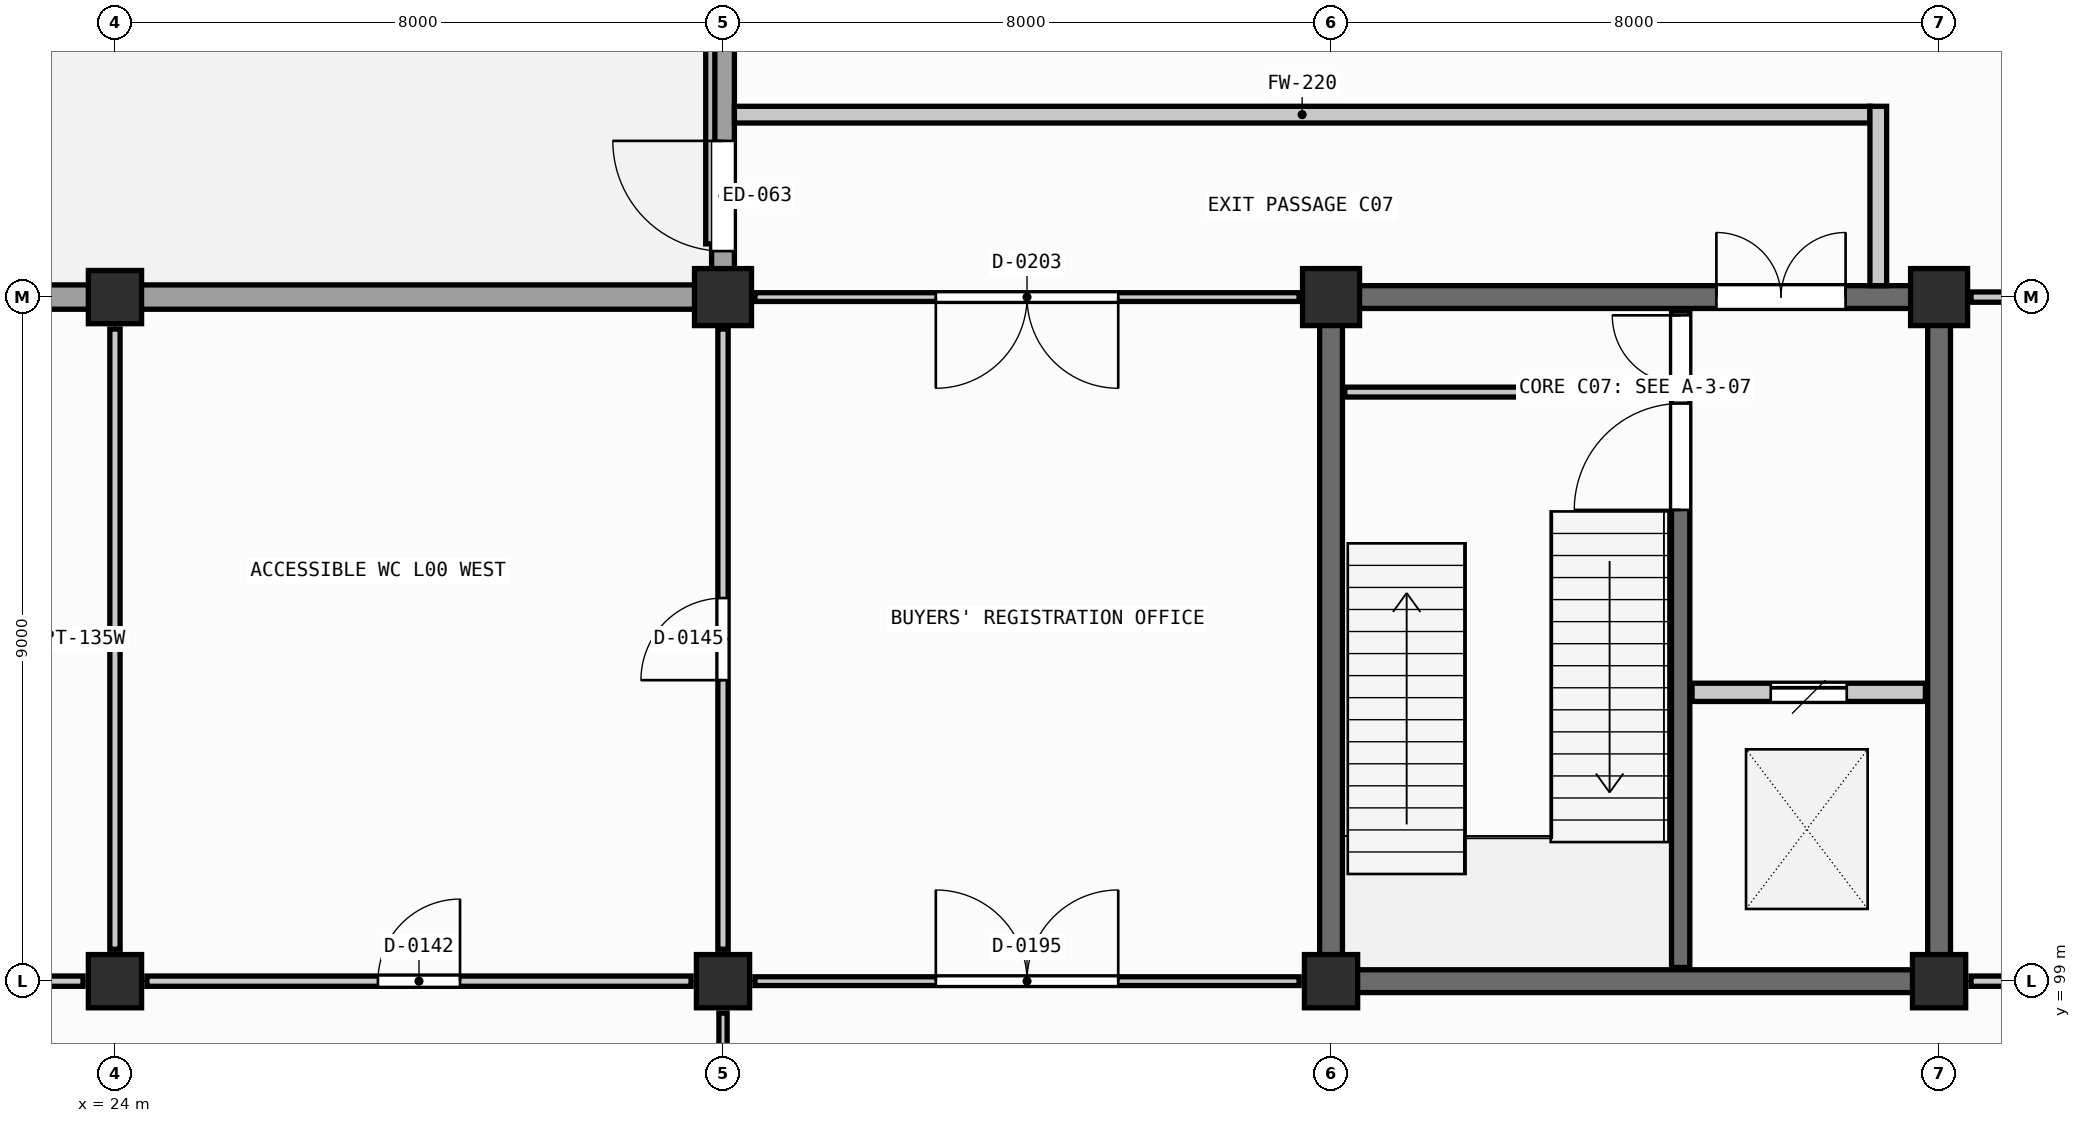
"""IFC4 building model, lengths in metres.
Left out: names, types, materials, properties, quantities, classifications, styles, units other than length and angle.
Written with IfcOpenShell. Run it as: python <this file> out.ifc"""

import sys

from ifc_helpers import new_model, si_unit, direction, frame, frame_2d, origin, origin_2d, place, context, subcontext, project, spatial, rectangle, extrude, element, fill, save


model = new_model("IFC4")
c1 = context("Model", 3, precision=1e-05, world=origin(), true_north=direction((0.0, 1.0)))
c2 = subcontext(c1, "Body", "Model", "MODEL_VIEW")
j1 = project(units=[si_unit("LENGTHUNIT", "METRE"), si_unit("PLANEANGLEUNIT", "RADIAN")], contexts=[c1])
p1 = place(None, origin())
s1 = spatial("IfcSite", under=j1, at=p1, CompositionType="ELEMENT")
p2 = place(p1, origin())
s2 = spatial("IfcBuilding", under=s1, at=p2, CompositionType="ELEMENT")
p3 = place(p2, origin())
s3 = spatial("IfcBuildingStorey", under=s2, at=p3, CompositionType="ELEMENT", Elevation=0.0)
for number, where, z_axis, x_axis in (
    (1, (24.0, 99.0, -1.25), (0.0, 0.0, 1.0), (1.0, 0.0, 0.0)),
    (2, (24.0, 108.0, -1.25), (0.0, 0.0, 1.0), (1.0, 0.0, 0.0)),
    (3, (32.0, 99.0, -1.25), (0.0, 0.0, 1.0), (1.0, 0.0, 0.0)),
):
    element("IfcColumn", number, at=place(p3, frame(where, z_axis=z_axis, x_axis=x_axis)), inside=s3, PredefinedType="COLUMN", context=c2, shape_type="SweptSolid", body=[
        extrude(rectangle(XDim=0.7, YDim=0.7, at=origin_2d()), origin(), (0.0, 0.0, 1.0), 6.05),
    ])
p4 = place(p3, frame((32.0, 108.0, -1.25), z_axis=(0.0, 0.0, 1.0), x_axis=(1.0, 0.0, 0.0)))
e4 = element("IfcColumn", 4, at=p4, inside=s3, PredefinedType="COLUMN", context=c2, shape_type="SweptSolid", body=[
    extrude(rectangle(XDim=0.75, YDim=0.75, at=origin_2d()), origin(), (0.0, 0.0, 1.0), 6.05),
])
p5 = place(p3, frame((40.0, 99.0, -1.25), z_axis=(0.0, 0.0, 1.0), x_axis=(1.0, 0.0, 0.0)))
e5 = element("IfcColumn", 5, at=p5, inside=s3, PredefinedType="COLUMN", context=c2, shape_type="SweptSolid", body=[
    extrude(rectangle(XDim=0.7, YDim=0.7, at=origin_2d()), origin(), (0.0, 0.0, 1.0), 6.05),
])
p6 = place(p3, frame((40.0, 108.0, -1.25), z_axis=(0.0, 0.0, 1.0), x_axis=(1.0, 0.0, 0.0)))
e6 = element("IfcColumn", 6, at=p6, inside=s3, PredefinedType="COLUMN", context=c2, shape_type="SweptSolid", body=[
    extrude(rectangle(XDim=0.75, YDim=0.75, at=origin_2d()), origin(), (0.0, 0.0, 1.0), 6.05),
])
p7 = place(p3, frame((48.0, 99.0, -1.25), z_axis=(0.0, 0.0, 1.0), x_axis=(1.0, 0.0, 0.0)))
e7 = element("IfcColumn", 7, at=p7, inside=s3, PredefinedType="COLUMN", context=c2, shape_type="SweptSolid", body=[
    extrude(rectangle(XDim=0.7, YDim=0.7, at=origin_2d()), origin(), (0.0, 0.0, 1.0), 6.05),
])
p8 = place(p3, frame((48.0, 108.0, -1.25), z_axis=(0.0, 0.0, 1.0), x_axis=(1.0, 0.0, 0.0)))
e8 = element("IfcColumn", 8, at=p8, inside=s3, PredefinedType="COLUMN", context=c2, shape_type="SweptSolid", body=[
    extrude(rectangle(XDim=0.75, YDim=0.75, at=origin_2d()), origin(), (0.0, 0.0, 1.0), 6.05),
])
p9 = place(p3, frame((23.655, 108.0, 0.0), z_axis=(0.0, 0.0, 1.0), x_axis=(-1.0, 0.0, 0.0)))
e9 = element("IfcWall", 9, at=p9, inside=s3, PredefinedType="SOLIDWALL", context=c2, shape_type="SweptSolid", body=[
    extrude(rectangle(XDim=7.31, YDim=0.32, at=frame_2d((3.655, 0.0))), origin(), (0.0, 0.0, 1.0), 3.65),
])
p10 = place(p3, frame((31.63, 108.0, 0.0), z_axis=(0.0, 0.0, 1.0), x_axis=(-1.0, 0.0, 0.0)))
e10 = element("IfcWall", 10, at=p10, inside=s3, PredefinedType="SOLIDWALL", context=c2, shape_type="SweptSolid", body=[
    extrude(rectangle(XDim=7.285, YDim=0.32, at=frame_2d((3.643, 0.0))), origin(), (0.0, 0.0, 1.0), 3.65),
])
p11 = place(p3, frame((32.0, 116.655, 0.0), z_axis=(0.0, 0.0, 1.0), x_axis=(0.0, -1.0, 0.0)))
e11 = element("IfcWall", 11, at=p11, inside=s3, PredefinedType="SOLIDWALL", context=c2, shape_type="SweptSolid", body=[
    extrude(rectangle(XDim=8.285, YDim=0.3, at=frame_2d((4.143, 0.0))), origin(), (0.0, 0.0, 1.0), 3.65),
])
p12 = place(p11, frame((3.417, 0.0, 0.0)))
e12 = element("IfcOpeningElement", 12, at=p12, cuts=e11, PredefinedType="OPENING", context=c2, shape_type="SweptSolid", body=[
    extrude(rectangle(XDim=1.45, YDim=2.2, at=frame_2d((0.725, 1.1))), frame((0.0, 0.16, 0.0), z_axis=(0.0, -1.0, 0.0), x_axis=(1.0, 0.0, 0.0)), (0.0, 0.0, 1.0), 0.32),
])
p13 = place(p11, frame((6.6, 0.0, 0.0)))
e13 = element("IfcOpeningElement", 13, at=p13, cuts=e11, PredefinedType="OPENING", context=c2, shape_type="SweptSolid", body=[
    extrude(rectangle(XDim=1.45, YDim=2.2, at=frame_2d((0.725, 1.1))), frame((0.0, 0.16, 0.0), z_axis=(0.0, -1.0, 0.0), x_axis=(1.0, 0.0, 0.0)), (0.0, 0.0, 1.0), 0.32),
])
p14 = place(p3, frame((40.345, 99.0, -1.25), z_axis=(0.0, 0.0, 1.0), x_axis=(1.0, 0.0, 0.0)))
e14 = element("IfcWall", 14, at=p14, inside=s3, PredefinedType="SHEAR", context=c2, shape_type="SweptSolid", body=[
    extrude(rectangle(XDim=7.31, YDim=0.3, at=frame_2d((3.655, 0.0))), origin(), (0.0, 0.0, 1.0), 5.805),
])
p15 = place(p3, frame((40.37, 108.0, -1.25), z_axis=(0.0, 0.0, 1.0), x_axis=(1.0, 0.0, 0.0)))
e15 = element("IfcWall", 15, at=p15, inside=s3, PredefinedType="SHEAR", context=c2, shape_type="SweptSolid", body=[
    extrude(rectangle(XDim=7.26, YDim=0.3, at=frame_2d((3.63, 0.0))), origin(), (0.0, 0.0, 1.0), 5.805),
])
p16 = place(p15, frame((4.7, 0.0, 1.25)))
e16 = element("IfcOpeningElement", 16, at=p16, cuts=e15, PredefinedType="OPENING", context=c2, shape_type="SweptSolid", body=[
    extrude(rectangle(XDim=1.7, YDim=2.25, at=frame_2d((0.85, 1.125))), frame((0.0, 0.16, 0.0), z_axis=(0.0, -1.0, 0.0), x_axis=(1.0, 0.0, 0.0)), (0.0, 0.0, 1.0), 0.32),
])
for number, where, z_axis, x_axis in (
    (17, (40.0, 99.345, -1.25), (0.0, 0.0, 1.0), (0.0, 1.0, 0.0)),
    (18, (48.0, 99.345, -1.25), (0.0, 0.0, 1.0), (0.0, 1.0, 0.0)),
):
    element("IfcWall", number, at=place(p3, frame(where, z_axis=z_axis, x_axis=x_axis)), inside=s3, PredefinedType="SHEAR", context=c2, shape_type="SweptSolid", body=[
        extrude(rectangle(XDim=8.285, YDim=0.3, at=frame_2d((4.143, 0.0))), origin(), (0.0, 0.0, 1.0), 5.805),
    ])
p17 = place(p3, frame((44.6, 99.18, -1.25), z_axis=(0.0, 0.0, 1.0), x_axis=(0.0, 1.0, 0.0)))
e19 = element("IfcWall", 19, at=p17, inside=s3, PredefinedType="SHEAR", context=c2, shape_type="SweptSolid", body=[
    extrude(rectangle(XDim=8.64, YDim=0.24, at=frame_2d((4.32, 0.0))), origin(), (0.0, 0.0, 1.0), 5.805),
])
p18 = place(p17, frame((6.02, 0.0, 1.25)))
e20 = element("IfcOpeningElement", 20, at=p18, cuts=e19, PredefinedType="OPENING", context=c2, shape_type="SweptSolid", body=[
    extrude(rectangle(XDim=1.4, YDim=2.2, at=frame_2d((0.7, 1.1))), frame((0.0, 0.13, 0.0), z_axis=(0.0, -1.0, 0.0), x_axis=(1.0, 0.0, 0.0)), (0.0, 0.0, 1.0), 0.26),
])
p19 = place(p17, frame((7.68, 0.0, 1.25)))
e21 = element("IfcOpeningElement", 21, at=p19, cuts=e19, PredefinedType="OPENING", context=c2, shape_type="SweptSolid", body=[
    extrude(rectangle(XDim=0.9, YDim=2.05, at=frame_2d((0.45, 1.025))), frame((0.0, 0.13, 0.0), z_axis=(0.0, -1.0, 0.0), x_axis=(1.0, 0.0, 0.0)), (0.0, 0.0, 1.0), 0.26),
])
p20 = place(p3, frame((40.18, 106.75, 0.0), z_axis=(0.0, 0.0, 1.0), x_axis=(1.0, 0.0, 0.0)))
e22 = element("IfcWall", 22, at=p20, inside=s3, PredefinedType="PARTITIONING", context=c2, shape_type="SweptSolid", body=[
    extrude(rectangle(XDim=4.28, YDim=0.13, at=frame_2d((2.14, 0.0))), origin(), (0.0, 0.0, 1.0), 3.905),
])
p21 = place(p3, frame((44.75, 102.8, 0.0), z_axis=(0.0, 0.0, 1.0), x_axis=(1.0, 0.0, 0.0)))
e23 = element("IfcWall", 23, at=p21, inside=s3, PredefinedType="SHEAR", context=c2, shape_type="SweptSolid", body=[
    extrude(rectangle(XDim=3.07, YDim=0.24, at=frame_2d((1.535, 0.0))), origin(), (0.0, 0.0, 1.0), 3.905),
])
p22 = place(p21, frame((1.035, 0.0, 0.0)))
e24 = element("IfcOpeningElement", 24, at=p22, cuts=e23, PredefinedType="OPENING", context=c2, shape_type="SweptSolid", body=[
    extrude(rectangle(XDim=1.0, YDim=2.15, at=frame_2d((0.5, 1.075))), frame((0.0, 0.13, 0.0), z_axis=(0.0, -1.0, 0.0), x_axis=(1.0, 0.0, 0.0)), (0.0, 0.0, 1.0), 0.26),
])
p23 = place(p3, frame((20.06, 99.0, 0.0), z_axis=(0.0, 0.0, 1.0), x_axis=(1.0, 0.0, 0.0)))
e25 = element("IfcWall", 25, at=p23, inside=s3, PredefinedType="PLUMBINGWALL", context=c2, shape_type="SweptSolid", body=[
    extrude(rectangle(XDim=3.52, YDim=0.135, at=frame_2d((1.76, 0.0))), origin(), (0.0, 0.0, 1.0), 3.65),
])
p24 = place(p23, frame((1.3, 0.0, 0.0)))
e26 = element("IfcOpeningElement", 26, at=p24, cuts=e25, PredefinedType="OPENING", context=c2, shape_type="SweptSolid", body=[
    extrude(rectangle(XDim=0.92, YDim=2.08, at=frame_2d((0.46, 1.04))), frame((0.0, 0.078, 0.0), z_axis=(0.0, -1.0, 0.0), x_axis=(1.0, 0.0, 0.0)), (0.0, 0.0, 1.0), 0.155),
])
p25 = place(p3, frame((24.42, 99.0, 0.0), z_axis=(0.0, 0.0, 1.0), x_axis=(1.0, 0.0, 0.0)))
e27 = element("IfcWall", 27, at=p25, inside=s3, PredefinedType="PLUMBINGWALL", context=c2, shape_type="SweptSolid", body=[
    extrude(rectangle(XDim=7.16, YDim=0.135, at=frame_2d((3.58, 0.0))), origin(), (0.0, 0.0, 1.0), 3.65),
])
p26 = place(p25, frame((3.04, 0.0, 0.0)))
e28 = element("IfcOpeningElement", 28, at=p26, cuts=e27, PredefinedType="OPENING", context=c2, shape_type="SweptSolid", body=[
    extrude(rectangle(XDim=1.08, YDim=2.12, at=frame_2d((0.54, 1.06))), frame((0.0, 0.078, 0.0), z_axis=(0.0, -1.0, 0.0), x_axis=(1.0, 0.0, 0.0)), (0.0, 0.0, 1.0), 0.155),
])
p27 = place(p3, frame((32.0, 90.42, 0.0), z_axis=(0.0, 0.0, 1.0), x_axis=(0.0, 1.0, 0.0)))
e29 = element("IfcWall", 29, at=p27, inside=s3, PredefinedType="PARTITIONING", context=c2, shape_type="SweptSolid", body=[
    extrude(rectangle(XDim=8.16, YDim=0.108, at=frame_2d((4.08, 0.0))), origin(), (0.0, 0.0, 1.0), 3.65),
])
p28 = place(p27, frame((2.955, 0.0, 0.0)))
e30 = element("IfcOpeningElement", 30, at=p28, cuts=e29, PredefinedType="OPENING", context=c2, shape_type="SweptSolid", body=[
    extrude(rectangle(XDim=2.25, YDim=2.38, at=frame_2d((1.125, 1.19))), frame((0.0, 0.064, 0.0), z_axis=(0.0, -1.0, 0.0), x_axis=(1.0, 0.0, 0.0)), (0.0, 0.0, 1.0), 0.128),
])
p29 = place(p3, frame((24.0, 99.42, 0.0), z_axis=(0.0, 0.0, 1.0), x_axis=(0.0, 1.0, 0.0)))
e31 = element("IfcWall", 31, at=p29, inside=s3, PredefinedType="PLUMBINGWALL", context=c2, shape_type="SweptSolid", body=[
    extrude(rectangle(XDim=8.16, YDim=0.135, at=frame_2d((4.08, 0.0))), origin(), (0.0, 0.0, 1.0), 3.65),
])
p30 = place(p3, frame((32.0, 99.42, 0.0), z_axis=(0.0, 0.0, 1.0), x_axis=(0.0, 1.0, 0.0)))
e32 = element("IfcWall", 32, at=p30, inside=s3, PredefinedType="PLUMBINGWALL", context=c2, shape_type="SweptSolid", body=[
    extrude(rectangle(XDim=8.16, YDim=0.135, at=frame_2d((4.08, 0.0))), origin(), (0.0, 0.0, 1.0), 3.65),
])
p31 = place(p30, frame((3.54, 0.0, 0.0)))
e33 = element("IfcOpeningElement", 33, at=p31, cuts=e32, PredefinedType="OPENING", context=c2, shape_type="SweptSolid", body=[
    extrude(rectangle(XDim=1.08, YDim=2.12, at=frame_2d((0.54, 1.06))), frame((0.0, 0.078, 0.0), z_axis=(0.0, -1.0, 0.0), x_axis=(1.0, 0.0, 0.0)), (0.0, 0.0, 1.0), 0.155),
])
p32 = place(p3, frame((32.42, 99.0, 0.0), z_axis=(0.0, 0.0, 1.0), x_axis=(1.0, 0.0, 0.0)))
e34 = element("IfcWall", 34, at=p32, inside=s3, PredefinedType="PARTITIONING", context=c2, shape_type="SweptSolid", body=[
    extrude(rectangle(XDim=7.16, YDim=0.115, at=frame_2d((3.58, 0.0))), origin(), (0.0, 0.0, 1.0), 3.65),
])
p33 = place(p32, frame((2.38, 0.0, 0.0)))
e35 = element("IfcOpeningElement", 35, at=p33, cuts=e34, PredefinedType="OPENING", context=c2, shape_type="SweptSolid", body=[
    extrude(rectangle(XDim=2.4, YDim=2.4, at=frame_2d((1.2, 1.2))), frame((0.0, 0.067, 0.0), z_axis=(0.0, -1.0, 0.0), x_axis=(1.0, 0.0, 0.0)), (0.0, 0.0, 1.0), 0.135),
])
p34 = place(p3, frame((48.42, 99.0, 0.0), z_axis=(0.0, 0.0, 1.0), x_axis=(1.0, 0.0, 0.0)))
e36 = element("IfcWall", 36, at=p34, inside=s3, PredefinedType="PLUMBINGWALL", context=c2, shape_type="SweptSolid", body=[
    extrude(rectangle(XDim=7.16, YDim=0.135, at=frame_2d((3.58, 0.0))), origin(), (0.0, 0.0, 1.0), 3.65),
])
p35 = place(p34, frame((3.12, 0.0, 0.0)))
e37 = element("IfcOpeningElement", 37, at=p35, cuts=e36, PredefinedType="OPENING", context=c2, shape_type="SweptSolid", body=[
    extrude(rectangle(XDim=0.92, YDim=2.08, at=frame_2d((0.46, 1.04))), frame((0.0, 0.078, 0.0), z_axis=(0.0, -1.0, 0.0), x_axis=(1.0, 0.0, 0.0)), (0.0, 0.0, 1.0), 0.155),
])
p36 = place(p3, frame((32.42, 108.0, 0.0), z_axis=(0.0, 0.0, 1.0), x_axis=(1.0, 0.0, 0.0)))
e38 = element("IfcWall", 38, at=p36, inside=s3, PredefinedType="PARTITIONING", context=c2, shape_type="SweptSolid", body=[
    extrude(rectangle(XDim=7.16, YDim=0.115, at=frame_2d((3.58, 0.0))), origin(), (0.0, 0.0, 1.0), 3.65),
])
p37 = place(p36, frame((2.38, 0.0, 0.0)))
e39 = element("IfcOpeningElement", 39, at=p37, cuts=e38, PredefinedType="OPENING", context=c2, shape_type="SweptSolid", body=[
    extrude(rectangle(XDim=2.4, YDim=2.4, at=frame_2d((1.2, 1.2))), frame((0.0, 0.067, 0.0), z_axis=(0.0, -1.0, 0.0), x_axis=(1.0, 0.0, 0.0)), (0.0, 0.0, 1.0), 0.135),
])
p38 = place(p3, frame((48.42, 108.0, 0.0), z_axis=(0.0, 0.0, 1.0), x_axis=(1.0, 0.0, 0.0)))
e40 = element("IfcWall", 40, at=p38, inside=s3, PredefinedType="PLUMBINGWALL", context=c2, shape_type="SweptSolid", body=[
    extrude(rectangle(XDim=7.16, YDim=0.135, at=frame_2d((3.58, 0.0))), origin(), (0.0, 0.0, 1.0), 3.65),
])
p39 = place(p38, frame((3.12, 0.0, 0.0)))
e41 = element("IfcOpeningElement", 41, at=p39, cuts=e40, PredefinedType="OPENING", context=c2, shape_type="SweptSolid", body=[
    extrude(rectangle(XDim=0.92, YDim=2.08, at=frame_2d((0.46, 1.04))), frame((0.0, 0.078, 0.0), z_axis=(0.0, -1.0, 0.0), x_axis=(1.0, 0.0, 0.0)), (0.0, 0.0, 1.0), 0.155),
])
p40 = place(p3, frame((32.15, 110.4, 0.0), z_axis=(0.0, 0.0, 1.0), x_axis=(1.0, 0.0, 0.0)))
e42 = element("IfcWall", 42, at=p40, inside=s3, PredefinedType="SOLIDWALL", context=c2, shape_type="SweptSolid", body=[
    extrude(rectangle(XDim=14.94, YDim=0.22, at=frame_2d((7.47, 0.0))), origin(), (0.0, 0.0, 1.0), 3.65),
])
p41 = place(p3, frame((47.2, 108.15, 0.0), z_axis=(0.0, 0.0, 1.0), x_axis=(0.0, 1.0, 0.0)))
e43 = element("IfcWall", 43, at=p41, inside=s3, PredefinedType="SOLIDWALL", context=c2, shape_type="SweptSolid", body=[
    extrude(rectangle(XDim=2.36, YDim=0.22, at=frame_2d((1.18, 0.0))), origin(), (0.0, 0.0, 1.0), 3.65),
])
p42 = place(p18, origin())
e44 = element("IfcDoor", 44, at=p42, inside=s3, OperationType="SINGLE_SWING_LEFT", PredefinedType="DOOR", context=c2, shape_type="SweptSolid", body=[
    extrude(rectangle(XDim=1.4, YDim=2.2, at=frame_2d((0.7, 1.1))), frame((0.0, 0.025, 0.0), z_axis=(0.0, -1.0, 0.0), x_axis=(1.0, 0.0, 0.0)), (0.0, 0.0, 1.0), 0.05),
])
fill(e20, e44)
p43 = place(p19, origin())
e45 = element("IfcDoor", 45, at=p43, inside=s3, OperationType="SINGLE_SWING_RIGHT", PredefinedType="DOOR", context=c2, shape_type="SweptSolid", body=[
    extrude(rectangle(XDim=0.9, YDim=2.05, at=frame_2d((0.45, 1.025))), frame((0.0, 0.025, 0.0), z_axis=(0.0, -1.0, 0.0), x_axis=(1.0, 0.0, 0.0)), (0.0, 0.0, 1.0), 0.05),
])
fill(e21, e45)
p44 = place(p16, origin())
e46 = element("IfcDoor", 46, at=p44, inside=s3, OperationType="DOUBLE_DOOR_SINGLE_SWING", PredefinedType="DOOR", context=c2, shape_type="SweptSolid", body=[
    extrude(rectangle(XDim=1.7, YDim=2.25, at=frame_2d((0.85, 1.125))), frame((0.0, 0.025, 0.0), z_axis=(0.0, -1.0, 0.0), x_axis=(1.0, 0.0, 0.0)), (0.0, 0.0, 1.0), 0.05),
])
fill(e16, e46)
p45 = place(p22, origin())
e47 = element("IfcDoor", 47, at=p45, inside=s3, OperationType="SLIDING_TO_LEFT", PredefinedType="DOOR", context=c2, shape_type="SweptSolid", body=[
    extrude(rectangle(XDim=1.0, YDim=2.15, at=frame_2d((0.5, 1.075))), frame((0.0, 0.025, 0.0), z_axis=(0.0, -1.0, 0.0), x_axis=(1.0, 0.0, 0.0)), (0.0, 0.0, 1.0), 0.05),
])
fill(e24, e47)
p46 = place(p26, origin())
e48 = element("IfcDoor", 48, at=p46, inside=s3, OperationType="SINGLE_SWING_RIGHT", PredefinedType="DOOR", context=c2, shape_type="SweptSolid", body=[
    extrude(rectangle(XDim=1.08, YDim=2.12, at=frame_2d((0.54, 1.06))), frame((0.0, 0.025, 0.0), z_axis=(0.0, -1.0, 0.0), x_axis=(1.0, 0.0, 0.0)), (0.0, 0.0, 1.0), 0.05),
])
fill(e28, e48)
p47 = place(p31, origin())
e49 = element("IfcDoor", 49, at=p47, inside=s3, OperationType="SINGLE_SWING_LEFT", PredefinedType="DOOR", context=c2, shape_type="SweptSolid", body=[
    extrude(rectangle(XDim=1.08, YDim=2.12, at=frame_2d((0.54, 1.06))), frame((0.0, 0.025, 0.0), z_axis=(0.0, -1.0, 0.0), x_axis=(1.0, 0.0, 0.0)), (0.0, 0.0, 1.0), 0.05),
])
fill(e33, e49)
p48 = place(p33, origin())
e50 = element("IfcDoor", 50, at=p48, inside=s3, OperationType="DOUBLE_DOOR_SINGLE_SWING", PredefinedType="DOOR", context=c2, shape_type="SweptSolid", body=[
    extrude(rectangle(XDim=2.4, YDim=2.4, at=frame_2d((1.2, 1.2))), frame((0.0, 0.025, 0.0), z_axis=(0.0, -1.0, 0.0), x_axis=(1.0, 0.0, 0.0)), (0.0, 0.0, 1.0), 0.05),
])
fill(e35, e50)
p49 = place(p37, frame((2.4, 0.0, 0.0), z_axis=(0.0, 0.0, 1.0), x_axis=(-1.0, 0.0, 0.0)))
e51 = element("IfcDoor", 51, at=p49, inside=s3, OperationType="DOUBLE_DOOR_SINGLE_SWING", PredefinedType="DOOR", context=c2, shape_type="SweptSolid", body=[
    extrude(rectangle(XDim=2.4, YDim=2.4, at=frame_2d((1.2, 1.2))), frame((0.0, 0.025, 0.0), z_axis=(0.0, -1.0, 0.0), x_axis=(1.0, 0.0, 0.0)), (0.0, 0.0, 1.0), 0.05),
])
fill(e39, e51)
p50 = place(p13, frame((1.45, 0.0, 0.0), z_axis=(0.0, 0.0, 1.0), x_axis=(-1.0, 0.0, 0.0)))
e52 = element("IfcDoor", 52, at=p50, inside=s3, OperationType="SINGLE_SWING_LEFT", PredefinedType="DOOR", context=c2, shape_type="SweptSolid", body=[
    extrude(rectangle(XDim=1.45, YDim=2.2, at=frame_2d((0.725, 1.1))), frame((0.0, 0.025, 0.0), z_axis=(0.0, -1.0, 0.0), x_axis=(1.0, 0.0, 0.0)), (0.0, 0.0, 1.0), 0.05),
])
fill(e13, e52)
save(model, sys.argv[1])
